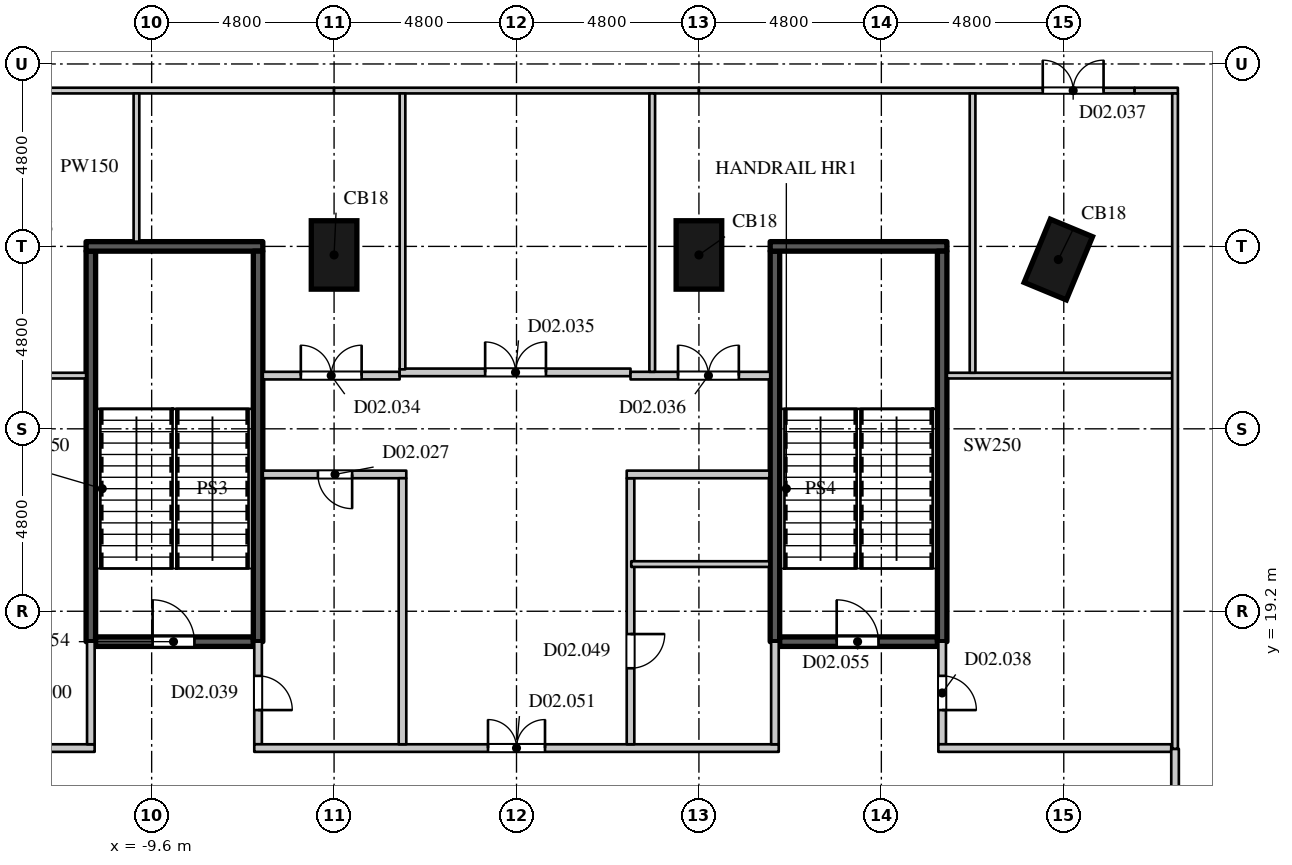
"""IFC4 building model, lengths in metres.
Left out: names, types, materials, properties, quantities, classifications, styles, units other than length and angle.
Written with IfcOpenShell. Run it as: python <this file> out.ifc"""

import sys

from ifc_helpers import new_model, si_unit, direction, frame, frame_2d, origin, origin_2d, place, context, subcontext, project, spatial, rectangle, extrude, element, fill, save


model = new_model("IFC4")
c1 = context("Model", 3, precision=1e-05, world=origin(), true_north=direction((0.0, 1.0)))
c2 = subcontext(c1, "Body", "Model", "MODEL_VIEW")
j1 = project(units=[si_unit("LENGTHUNIT", "METRE"), si_unit("PLANEANGLEUNIT", "RADIAN")], contexts=[c1])
p1 = place(None, origin())
s1 = spatial("IfcSite", under=j1, at=p1, CompositionType="ELEMENT")
p2 = place(p1, origin())
s2 = spatial("IfcBuilding", under=s1, at=p2, CompositionType="ELEMENT")
p3 = place(p2, frame((0.0, 0.0, 11.0)))
s3 = spatial("IfcBuildingStorey", under=s2, at=p3, CompositionType="ELEMENT", Elevation=11.0)
for number, where, z_axis, x_axis in (
    (1, (14.257, 28.454, 0.0), (0.0, 0.0, 1.0), (-0.924, 0.383, 0.0)),
    (2, (-4.8, 28.575, 0.0), (0.0, 0.0, 1.0), (-1.0, 0.0, 0.0)),
    (3, (4.8, 28.575, 0.0), (0.0, 0.0, 1.0), (-1.0, 0.0, 0.0)),
):
    element("IfcColumn", number, at=place(p3, frame(where, z_axis=z_axis, x_axis=x_axis)), inside=s3, PredefinedType="COLUMN", context=c2, shape_type="SweptSolid", body=[
        extrude(rectangle(XDim=1.2, YDim=1.8, at=origin_2d()), origin(), (0.0, 0.0, 1.0), 5.0),
    ])
p4 = place(p3, frame((-17.228, 15.6, 0.0), z_axis=(0.0, 0.0, 1.0), x_axis=(1.0, 0.0, 0.0)))
e4 = element("IfcWall", 4, at=p4, inside=s3, PredefinedType="PARTITIONING", context=c2, shape_type="SweptSolid", body=[
    extrude(rectangle(XDim=6.128, YDim=0.2, at=frame_2d((3.064, 0.0))), origin(), (0.0, 0.0, 1.0), 4.65),
])
p5 = place(p4, frame((2.25, 0.0, 0.0)))
e5 = element("IfcOpeningElement", 5, at=p5, cuts=e4, PredefinedType="OPENING", context=c2, shape_type="SweptSolid", body=[
    extrude(rectangle(XDim=1.6, YDim=2.4, at=frame_2d((0.8, 1.2))), frame((0.0, 0.11, 0.0), z_axis=(0.0, -1.0, 0.0), x_axis=(1.0, 0.0, 0.0)), (0.0, 0.0, 1.0), 0.22),
])
p6 = place(p3, frame((-11.2, 15.7, 0.0), z_axis=(0.0, 0.0, 1.0), x_axis=(0.0, 1.0, 0.0)))
e6 = element("IfcWall", 6, at=p6, inside=s3, PredefinedType="PARTITIONING", context=c2, shape_type="SweptSolid", body=[
    extrude(rectangle(XDim=2.7, YDim=0.2, at=frame_2d((1.35, 0.0))), origin(), (0.0, 0.0, 1.0), 4.65),
])
p7 = place(p3, frame((-6.8, 15.7, 0.0), z_axis=(0.0, 0.0, 1.0), x_axis=(0.0, 1.0, 0.0)))
e7 = element("IfcWall", 7, at=p7, inside=s3, PredefinedType="PARTITIONING", context=c2, shape_type="SweptSolid", body=[
    extrude(rectangle(XDim=2.7, YDim=0.2, at=frame_2d((1.35, 0.0))), origin(), (0.0, 0.0, 1.0), 4.65),
])
p8 = place(p7, frame((0.9, 0.0, 0.0)))
e8 = element("IfcOpeningElement", 8, at=p8, cuts=e7, PredefinedType="OPENING", context=c2, shape_type="SweptSolid", body=[
    extrude(rectangle(XDim=0.9, YDim=2.2, at=frame_2d((0.45, 1.1))), frame((0.0, 0.11, 0.0), z_axis=(0.0, -1.0, 0.0), x_axis=(1.0, 0.0, 0.0)), (0.0, 0.0, 1.0), 0.22),
])
p9 = place(p3, frame((-6.9, 15.6, 0.0), z_axis=(0.0, 0.0, 1.0), x_axis=(1.0, 0.0, 0.0)))
e9 = element("IfcWall", 9, at=p9, inside=s3, PredefinedType="PARTITIONING", context=c2, shape_type="SweptSolid", body=[
    extrude(rectangle(XDim=13.8, YDim=0.2, at=frame_2d((6.9, 0.0))), origin(), (0.0, 0.0, 1.0), 4.65),
])
p10 = place(p9, frame((6.15, 0.0, 0.0)))
e10 = element("IfcOpeningElement", 10, at=p10, cuts=e9, PredefinedType="OPENING", context=c2, shape_type="SweptSolid", body=[
    extrude(rectangle(XDim=1.5, YDim=2.2, at=frame_2d((0.75, 1.1))), frame((0.0, 0.11, 0.0), z_axis=(0.0, -1.0, 0.0), x_axis=(1.0, 0.0, 0.0)), (0.0, 0.0, 1.0), 0.22),
])
p11 = place(p3, frame((-6.675, 22.8, 0.0), z_axis=(0.0, 0.0, 1.0), x_axis=(1.0, 0.0, 0.0)))
e11 = element("IfcWall", 11, at=p11, inside=s3, PredefinedType="PARTITIONING", context=c2, shape_type="SweptSolid", body=[
    extrude(rectangle(XDim=3.775, YDim=0.2, at=frame_2d((1.888, 0.0))), origin(), (0.0, 0.0, 1.0), 4.65),
])
p12 = place(p11, frame((1.45, 0.0, 0.0)))
e12 = element("IfcOpeningElement", 12, at=p12, cuts=e11, PredefinedType="OPENING", context=c2, shape_type="SweptSolid", body=[
    extrude(rectangle(XDim=0.9, YDim=2.2, at=frame_2d((0.45, 1.1))), frame((0.0, 0.11, 0.0), z_axis=(0.0, -1.0, 0.0), x_axis=(1.0, 0.0, 0.0)), (0.0, 0.0, 1.0), 0.22),
])
p13 = place(p3, frame((-6.675, 25.4, 0.0), z_axis=(0.0, 0.0, 1.0), x_axis=(1.0, 0.0, 0.0)))
e13 = element("IfcWall", 13, at=p13, inside=s3, PredefinedType="PARTITIONING", context=c2, shape_type="SweptSolid", body=[
    extrude(rectangle(XDim=3.6, YDim=0.2, at=frame_2d((1.8, 0.0))), origin(), (0.0, 0.0, 1.0), 4.65),
])
p14 = place(p13, frame((1.0, 0.0, 0.0)))
e14 = element("IfcOpeningElement", 14, at=p14, cuts=e13, PredefinedType="OPENING", context=c2, shape_type="SweptSolid", body=[
    extrude(rectangle(XDim=1.6, YDim=2.4, at=frame_2d((0.8, 1.2))), frame((0.0, 0.11, 0.0), z_axis=(0.0, -1.0, 0.0), x_axis=(1.0, 0.0, 0.0)), (0.0, 0.0, 1.0), 0.22),
])
p15 = place(p3, frame((-3.0, 15.7, 0.0), z_axis=(0.0, 0.0, 1.0), x_axis=(0.0, 1.0, 0.0)))
e15 = element("IfcWall", 15, at=p15, inside=s3, PredefinedType="PARTITIONING", context=c2, shape_type="SweptSolid", body=[
    extrude(rectangle(XDim=7.0, YDim=0.2, at=frame_2d((3.5, 0.0))), origin(), (0.0, 0.0, 1.0), 4.65),
])
p16 = place(p3, frame((-3.075, 25.485, 0.0), z_axis=(0.0, 0.0, 1.0), x_axis=(1.0, 0.0, 0.0)))
e16 = element("IfcWall", 16, at=p16, inside=s3, PredefinedType="PARTITIONING", context=c2, shape_type="SweptSolid", body=[
    extrude(rectangle(XDim=6.075, YDim=0.2, at=frame_2d((3.038, 0.0))), origin(), (0.0, 0.0, 1.0), 4.65),
])
p17 = place(p16, frame((2.25, 0.0, 0.0)))
e17 = element("IfcOpeningElement", 17, at=p17, cuts=e16, PredefinedType="OPENING", context=c2, shape_type="SweptSolid", body=[
    extrude(rectangle(XDim=1.6, YDim=2.4, at=frame_2d((0.8, 1.2))), frame((0.0, 0.11, 0.0), z_axis=(0.0, -1.0, 0.0), x_axis=(1.0, 0.0, 0.0)), (0.0, 0.0, 1.0), 0.22),
])
p18 = place(p3, frame((3.0, 15.7, 0.0), z_axis=(0.0, 0.0, 1.0), x_axis=(0.0, 1.0, 0.0)))
e18 = element("IfcWall", 18, at=p18, inside=s3, PredefinedType="PARTITIONING", context=c2, shape_type="SweptSolid", body=[
    extrude(rectangle(XDim=7.0, YDim=0.2, at=frame_2d((3.5, 0.0))), origin(), (0.0, 0.0, 1.0), 4.65),
])
p19 = place(p18, frame((2.0, 0.0, 0.0)))
e19 = element("IfcOpeningElement", 19, at=p19, cuts=e18, PredefinedType="OPENING", context=c2, shape_type="SweptSolid", body=[
    extrude(rectangle(XDim=0.9, YDim=2.2, at=frame_2d((0.45, 1.1))), frame((0.0, 0.11, 0.0), z_axis=(0.0, -1.0, 0.0), x_axis=(1.0, 0.0, 0.0)), (0.0, 0.0, 1.0), 0.22),
])
p20 = place(p3, frame((2.9, 22.8, 0.0), z_axis=(0.0, 0.0, 1.0), x_axis=(1.0, 0.0, 0.0)))
e20 = element("IfcWall", 20, at=p20, inside=s3, PredefinedType="PARTITIONING", context=c2, shape_type="SweptSolid", body=[
    extrude(rectangle(XDim=3.755, YDim=0.2, at=frame_2d((1.877, 0.0))), origin(), (0.0, 0.0, 1.0), 4.65),
])
p21 = place(p3, frame((3.0, 25.4, 0.0), z_axis=(0.0, 0.0, 1.0), x_axis=(1.0, 0.0, 0.0)))
e21 = element("IfcWall", 21, at=p21, inside=s3, PredefinedType="PARTITIONING", context=c2, shape_type="SweptSolid", body=[
    extrude(rectangle(XDim=3.675, YDim=0.2, at=frame_2d((1.837, 0.0))), origin(), (0.0, 0.0, 1.0), 4.65),
])
p22 = place(p21, frame((1.25, 0.0, 0.0)))
e22 = element("IfcOpeningElement", 22, at=p22, cuts=e21, PredefinedType="OPENING", context=c2, shape_type="SweptSolid", body=[
    extrude(rectangle(XDim=1.6, YDim=2.4, at=frame_2d((0.8, 1.2))), frame((0.0, 0.11, 0.0), z_axis=(0.0, -1.0, 0.0), x_axis=(1.0, 0.0, 0.0)), (0.0, 0.0, 1.0), 0.22),
])
p23 = place(p3, frame((6.8, 15.7, 0.0), z_axis=(0.0, 0.0, 1.0), x_axis=(0.0, 1.0, 0.0)))
e23 = element("IfcWall", 23, at=p23, inside=s3, PredefinedType="PARTITIONING", context=c2, shape_type="SweptSolid", body=[
    extrude(rectangle(XDim=2.7, YDim=0.2, at=frame_2d((1.35, 0.0))), origin(), (0.0, 0.0, 1.0), 4.65),
])
p24 = place(p3, frame((11.2, 15.7, 0.0), z_axis=(0.0, 0.0, 1.0), x_axis=(0.0, 1.0, 0.0)))
e24 = element("IfcWall", 24, at=p24, inside=s3, PredefinedType="PARTITIONING", context=c2, shape_type="SweptSolid", body=[
    extrude(rectangle(XDim=2.7, YDim=0.2, at=frame_2d((1.35, 0.0))), origin(), (0.0, 0.0, 1.0), 4.65),
])
p25 = place(p24, frame((0.9, 0.0, 0.0)))
e25 = element("IfcOpeningElement", 25, at=p25, cuts=e24, PredefinedType="OPENING", context=c2, shape_type="SweptSolid", body=[
    extrude(rectangle(XDim=0.9, YDim=2.2, at=frame_2d((0.45, 1.1))), frame((0.0, 0.11, 0.0), z_axis=(0.0, -1.0, 0.0), x_axis=(1.0, 0.0, 0.0)), (0.0, 0.0, 1.0), 0.22),
])
p26 = place(p3, frame((11.1, 15.6, 0.0), z_axis=(0.0, 0.0, 1.0), x_axis=(1.0, 0.0, 0.0)))
e26 = element("IfcWall", 26, at=p26, inside=s3, PredefinedType="PARTITIONING", context=c2, shape_type="SweptSolid", body=[
    extrude(rectangle(XDim=6.128, YDim=0.2, at=frame_2d((3.064, 0.0))), origin(), (0.0, 0.0, 1.0), 4.65),
])
p27 = place(p3, frame((17.328, 11.3, 0.0), z_axis=(0.0, 0.0, 1.0), x_axis=(0.0, 1.0, 0.0)))
e27 = element("IfcWall", 27, at=p27, inside=s3, PredefinedType="PARTITIONING", context=c2, shape_type="SweptSolid", body=[
    extrude(rectangle(XDim=4.28, YDim=0.2, at=frame_2d((2.14, 0.0))), origin(), (0.0, 0.0, 1.0), 4.65),
])
p28 = place(p3, frame((-17.253, 25.4, 0.0), z_axis=(0.0, 0.0, 1.0), x_axis=(1.0, 0.0, 0.0)))
e28 = element("IfcWall", 28, at=p28, inside=s3, PredefinedType="PARTITIONING", context=c2, shape_type="SweptSolid", body=[
    extrude(rectangle(XDim=5.928, YDim=0.15, at=frame_2d((2.964, 0.0))), origin(), (0.0, 0.0, 1.0), 4.65),
])
p29 = place(p3, frame((-16.264, 32.9, 0.0), z_axis=(0.0, 0.0, 1.0), x_axis=(1.0, 0.0, 0.0)))
e29 = element("IfcWall", 29, at=p29, inside=s3, PredefinedType="PARTITIONING", context=c2, shape_type="SweptSolid", body=[
    extrude(rectangle(XDim=11.464, YDim=0.15, at=frame_2d((5.732, 0.0))), origin(), (0.0, 0.0, 1.0), 3.4),
])
p30 = place(p3, frame((-4.8, 32.9, 0.0), z_axis=(0.0, 0.0, 1.0), x_axis=(1.0, 0.0, 0.0)))
e30 = element("IfcWall", 30, at=p30, inside=s3, PredefinedType="PARTITIONING", context=c2, shape_type="SweptSolid", body=[
    extrude(rectangle(XDim=9.6, YDim=0.15, at=frame_2d((4.8, 0.0))), origin(), (0.0, 0.0, 1.0), 4.65),
])
p31 = place(p3, frame((4.8, 32.9, 0.0), z_axis=(0.0, 0.0, 1.0), x_axis=(1.0, 0.0, 0.0)))
e31 = element("IfcWall", 31, at=p31, inside=s3, PredefinedType="PARTITIONING", context=c2, shape_type="SweptSolid", body=[
    extrude(rectangle(XDim=11.464, YDim=0.15, at=frame_2d((5.732, 0.0))), origin(), (0.0, 0.0, 1.0), 3.4),
])
p32 = place(p31, frame((9.047, 0.0, 0.0)))
e32 = element("IfcOpeningElement", 32, at=p32, cuts=e31, PredefinedType="OPENING", context=c2, shape_type="SweptSolid", body=[
    extrude(rectangle(XDim=1.6, YDim=2.4, at=frame_2d((0.8, 1.2))), frame((0.0, 0.085, 0.0), z_axis=(0.0, -1.0, 0.0), x_axis=(1.0, 0.0, 0.0)), (0.0, 0.0, 1.0), 0.17),
])
p33 = place(p3, frame((16.264, 32.9, 0.0), z_axis=(0.0, 0.0, 1.0), x_axis=(1.0, 0.0, 0.0)))
e33 = element("IfcWall", 33, at=p33, inside=s3, PredefinedType="PARTITIONING", context=c2, shape_type="SweptSolid", body=[
    extrude(rectangle(XDim=1.138, YDim=0.15, at=frame_2d((0.569, 0.0))), origin(), (0.0, 0.0, 1.0), 4.65),
])
p34 = place(p3, frame((-10.0, 28.925, 0.0), z_axis=(0.0, 0.0, 1.0), x_axis=(0.0, 1.0, 0.0)))
e34 = element("IfcWall", 34, at=p34, inside=s3, PredefinedType="PARTITIONING", context=c2, shape_type="SweptSolid", body=[
    extrude(rectangle(XDim=3.9, YDim=0.15, at=frame_2d((1.95, 0.0))), origin(), (0.0, 0.0, 1.0), 4.65),
])
p35 = place(p3, frame((-3.0, 25.565, 0.0), z_axis=(0.0, 0.0, 1.0), x_axis=(0.0, 1.0, 0.0)))
e35 = element("IfcWall", 35, at=p35, inside=s3, PredefinedType="PARTITIONING", context=c2, shape_type="SweptSolid", body=[
    extrude(rectangle(XDim=7.26, YDim=0.15, at=frame_2d((3.63, 0.0))), origin(), (0.0, 0.0, 1.0), 4.65),
])
p36 = place(p3, frame((3.02, 20.441, 0.0), z_axis=(0.0, 0.0, 1.0), x_axis=(1.0, 0.0, 0.0)))
e36 = element("IfcWall", 36, at=p36, inside=s3, PredefinedType="PARTITIONING", context=c2, shape_type="SweptSolid", body=[
    extrude(rectangle(XDim=3.635, YDim=0.15, at=frame_2d((1.817, 0.0))), origin(), (0.0, 0.0, 1.0), 4.65),
])
p37 = place(p3, frame((3.571, 25.5, 0.0), z_axis=(0.0, 0.0, 1.0), x_axis=(0.0, 1.0, 0.0)))
e37 = element("IfcWall", 37, at=p37, inside=s3, PredefinedType="PARTITIONING", context=c2, shape_type="SweptSolid", body=[
    extrude(rectangle(XDim=7.325, YDim=0.15, at=frame_2d((3.663, 0.0))), origin(), (0.0, 0.0, 1.0), 4.65),
])
p38 = place(p3, frame((11.325, 25.4, 0.0), z_axis=(0.0, 0.0, 1.0), x_axis=(1.0, 0.0, 0.0)))
e38 = element("IfcWall", 38, at=p38, inside=s3, PredefinedType="PARTITIONING", context=c2, shape_type="SweptSolid", body=[
    extrude(rectangle(XDim=5.928, YDim=0.15, at=frame_2d((2.964, 0.0))), origin(), (0.0, 0.0, 1.0), 4.65),
])
p39 = place(p3, frame((12.0, 25.475, 0.0), z_axis=(0.0, 0.0, 1.0), x_axis=(0.0, 1.0, 0.0)))
e39 = element("IfcWall", 39, at=p39, inside=s3, PredefinedType="PARTITIONING", context=c2, shape_type="SweptSolid", body=[
    extrude(rectangle(XDim=7.35, YDim=0.15, at=frame_2d((3.675, 0.0))), origin(), (0.0, 0.0, 1.0), 4.65),
])
p40 = place(p3, frame((17.328, 15.58, 0.0), z_axis=(0.0, 0.0, 1.0), x_axis=(0.0, 1.0, 0.0)))
e40 = element("IfcWall", 40, at=p40, inside=s3, PredefinedType="PARTITIONING", context=c2, shape_type="SweptSolid", body=[
    extrude(rectangle(XDim=17.244, YDim=0.15, at=frame_2d((8.622, 0.0))), origin(), (0.0, 0.0, 1.0), 4.65),
])
p41 = place(p3, frame((-11.2, 18.4, 0.0), z_axis=(0.0, 0.0, 1.0), x_axis=(0.0, 1.0, 0.0)))
e41 = element("IfcWall", 41, at=p41, inside=s3, PredefinedType="SHEAR", context=c2, shape_type="SweptSolid", body=[
    extrude(rectangle(XDim=10.275, YDim=0.25, at=frame_2d((5.138, 0.0))), origin(), (0.0, 0.0, 1.0), 4.65),
])
p42 = place(p3, frame((-11.075, 18.4, 0.0), z_axis=(0.0, 0.0, 1.0), x_axis=(1.0, 0.0, 0.0)))
e42 = element("IfcWall", 42, at=p42, inside=s3, PredefinedType="SHEAR", context=c2, shape_type="SweptSolid", body=[
    extrude(rectangle(XDim=4.15, YDim=0.25, at=frame_2d((2.075, 0.0))), origin(), (0.0, 0.0, 1.0), 4.65),
])
p43 = place(p42, frame((1.5, 0.0, 0.0)))
e43 = element("IfcOpeningElement", 43, at=p43, cuts=e42, PredefinedType="OPENING", context=c2, shape_type="SweptSolid", body=[
    extrude(rectangle(XDim=1.1, YDim=2.2, at=frame_2d((0.55, 1.1))), frame((0.0, 0.135, 0.0), z_axis=(0.0, -1.0, 0.0), x_axis=(1.0, 0.0, 0.0)), (0.0, 0.0, 1.0), 0.27),
])
p44 = place(p3, frame((-11.325, 28.8, 0.0), z_axis=(0.0, 0.0, 1.0), x_axis=(1.0, 0.0, 0.0)))
e44 = element("IfcWall", 44, at=p44, inside=s3, PredefinedType="SHEAR", context=c2, shape_type="SweptSolid", body=[
    extrude(rectangle(XDim=4.65, YDim=0.25, at=frame_2d((2.325, 0.0))), origin(), (0.0, 0.0, 1.0), 4.65),
])
for number, where, z_axis, x_axis in (
    (45, (-6.8, 18.4, 0.0), (0.0, 0.0, 1.0), (0.0, 1.0, 0.0)),
    (46, (6.8, 18.4, 0.0), (0.0, 0.0, 1.0), (0.0, 1.0, 0.0)),
):
    element("IfcWall", number, at=place(p3, frame(where, z_axis=z_axis, x_axis=x_axis)), inside=s3, PredefinedType="SHEAR", context=c2, shape_type="SweptSolid", body=[
        extrude(rectangle(XDim=10.275, YDim=0.25, at=frame_2d((5.138, 0.0))), origin(), (0.0, 0.0, 1.0), 4.65),
    ])
p45 = place(p3, frame((6.925, 18.4, 0.0), z_axis=(0.0, 0.0, 1.0), x_axis=(1.0, 0.0, 0.0)))
e47 = element("IfcWall", 47, at=p45, inside=s3, PredefinedType="SHEAR", context=c2, shape_type="SweptSolid", body=[
    extrude(rectangle(XDim=4.15, YDim=0.25, at=frame_2d((2.075, 0.0))), origin(), (0.0, 0.0, 1.0), 4.65),
])
p46 = place(p45, frame((1.5, 0.0, 0.0)))
e48 = element("IfcOpeningElement", 48, at=p46, cuts=e47, PredefinedType="OPENING", context=c2, shape_type="SweptSolid", body=[
    extrude(rectangle(XDim=1.1, YDim=2.2, at=frame_2d((0.55, 1.1))), frame((0.0, 0.135, 0.0), z_axis=(0.0, -1.0, 0.0), x_axis=(1.0, 0.0, 0.0)), (0.0, 0.0, 1.0), 0.27),
])
p47 = place(p3, frame((6.675, 28.8, 0.0), z_axis=(0.0, 0.0, 1.0), x_axis=(1.0, 0.0, 0.0)))
e49 = element("IfcWall", 49, at=p47, inside=s3, PredefinedType="SHEAR", context=c2, shape_type="SweptSolid", body=[
    extrude(rectangle(XDim=4.65, YDim=0.25, at=frame_2d((2.325, 0.0))), origin(), (0.0, 0.0, 1.0), 4.65),
])
p48 = place(p3, frame((11.2, 18.4, 0.0), z_axis=(0.0, 0.0, 1.0), x_axis=(0.0, 1.0, 0.0)))
e50 = element("IfcWall", 50, at=p48, inside=s3, PredefinedType="SHEAR", context=c2, shape_type="SweptSolid", body=[
    extrude(rectangle(XDim=10.275, YDim=0.25, at=frame_2d((5.138, 0.0))), origin(), (0.0, 0.0, 1.0), 4.65),
])
p49 = place(p12, origin())
e51 = element("IfcDoor", 51, at=p49, inside=s3, OperationType="SINGLE_SWING_LEFT", PredefinedType="DOOR", context=c2, shape_type="SweptSolid", body=[
    extrude(rectangle(XDim=0.9, YDim=2.2, at=frame_2d((0.45, 1.1))), frame((0.0, 0.025, 0.0), z_axis=(0.0, -1.0, 0.0), x_axis=(1.0, 0.0, 0.0)), (0.0, 0.0, 1.0), 0.05),
])
fill(e12, e51)
p50 = place(p14, origin())
e52 = element("IfcDoor", 52, at=p50, inside=s3, OperationType="DOUBLE_DOOR_SINGLE_SWING", PredefinedType="DOOR", context=c2, shape_type="SweptSolid", body=[
    extrude(rectangle(XDim=1.6, YDim=2.4, at=frame_2d((0.8, 1.2))), frame((0.0, 0.025, 0.0), z_axis=(0.0, -1.0, 0.0), x_axis=(1.0, 0.0, 0.0)), (0.0, 0.0, 1.0), 0.05),
])
fill(e14, e52)
p51 = place(p17, origin())
e53 = element("IfcDoor", 53, at=p51, inside=s3, OperationType="DOUBLE_DOOR_SINGLE_SWING", PredefinedType="DOOR", context=c2, shape_type="SweptSolid", body=[
    extrude(rectangle(XDim=1.6, YDim=2.4, at=frame_2d((0.8, 1.2))), frame((0.0, 0.025, 0.0), z_axis=(0.0, -1.0, 0.0), x_axis=(1.0, 0.0, 0.0)), (0.0, 0.0, 1.0), 0.05),
])
fill(e17, e53)
p52 = place(p22, origin())
e54 = element("IfcDoor", 54, at=p52, inside=s3, OperationType="DOUBLE_DOOR_SINGLE_SWING", PredefinedType="DOOR", context=c2, shape_type="SweptSolid", body=[
    extrude(rectangle(XDim=1.6, YDim=2.4, at=frame_2d((0.8, 1.2))), frame((0.0, 0.025, 0.0), z_axis=(0.0, -1.0, 0.0), x_axis=(1.0, 0.0, 0.0)), (0.0, 0.0, 1.0), 0.05),
])
fill(e22, e54)
p53 = place(p32, origin())
e55 = element("IfcDoor", 55, at=p53, inside=s3, OperationType="DOUBLE_DOOR_SINGLE_SWING", PredefinedType="DOOR", context=c2, shape_type="SweptSolid", body=[
    extrude(rectangle(XDim=1.6, YDim=2.4, at=frame_2d((0.8, 1.2))), frame((0.0, 0.025, 0.0), z_axis=(0.0, -1.0, 0.0), x_axis=(1.0, 0.0, 0.0)), (0.0, 0.0, 1.0), 0.05),
])
fill(e32, e55)
p54 = place(p25, origin())
e56 = element("IfcDoor", 56, at=p54, inside=s3, OperationType="SINGLE_SWING_RIGHT", PredefinedType="DOOR", context=c2, shape_type="SweptSolid", body=[
    extrude(rectangle(XDim=0.9, YDim=2.2, at=frame_2d((0.45, 1.1))), frame((0.0, 0.025, 0.0), z_axis=(0.0, -1.0, 0.0), x_axis=(1.0, 0.0, 0.0)), (0.0, 0.0, 1.0), 0.05),
])
fill(e25, e56)
p55 = place(p8, origin())
e57 = element("IfcDoor", 57, at=p55, inside=s3, OperationType="SINGLE_SWING_RIGHT", PredefinedType="DOOR", context=c2, shape_type="SweptSolid", body=[
    extrude(rectangle(XDim=0.9, YDim=2.2, at=frame_2d((0.45, 1.1))), frame((0.0, 0.025, 0.0), z_axis=(0.0, -1.0, 0.0), x_axis=(1.0, 0.0, 0.0)), (0.0, 0.0, 1.0), 0.05),
])
fill(e8, e57)
p56 = place(p19, origin())
e58 = element("IfcDoor", 58, at=p56, inside=s3, OperationType="SINGLE_SWING_LEFT", PredefinedType="DOOR", context=c2, shape_type="SweptSolid", body=[
    extrude(rectangle(XDim=0.9, YDim=2.2, at=frame_2d((0.45, 1.1))), frame((0.0, 0.025, 0.0), z_axis=(0.0, -1.0, 0.0), x_axis=(1.0, 0.0, 0.0)), (0.0, 0.0, 1.0), 0.05),
])
fill(e19, e58)
p57 = place(p10, origin())
e59 = element("IfcDoor", 59, at=p57, inside=s3, OperationType="DOUBLE_DOOR_SINGLE_SWING", PredefinedType="DOOR", context=c2, shape_type="SweptSolid", body=[
    extrude(rectangle(XDim=1.5, YDim=2.2, at=frame_2d((0.75, 1.1))), frame((0.0, 0.025, 0.0), z_axis=(0.0, -1.0, 0.0), x_axis=(1.0, 0.0, 0.0)), (0.0, 0.0, 1.0), 0.05),
])
fill(e10, e59)
p58 = place(p43, origin())
e60 = element("IfcDoor", 60, at=p58, inside=s3, OperationType="SINGLE_SWING_LEFT", PredefinedType="DOOR", context=c2, shape_type="SweptSolid", body=[
    extrude(rectangle(XDim=1.1, YDim=2.2, at=frame_2d((0.55, 1.1))), frame((0.0, 0.025, 0.0), z_axis=(0.0, -1.0, 0.0), x_axis=(1.0, 0.0, 0.0)), (0.0, 0.0, 1.0), 0.05),
])
fill(e43, e60)
p59 = place(p46, origin())
e61 = element("IfcDoor", 61, at=p59, inside=s3, OperationType="SINGLE_SWING_LEFT", PredefinedType="DOOR", context=c2, shape_type="SweptSolid", body=[
    extrude(rectangle(XDim=1.1, YDim=2.2, at=frame_2d((0.55, 1.1))), frame((0.0, 0.025, 0.0), z_axis=(0.0, -1.0, 0.0), x_axis=(1.0, 0.0, 0.0)), (0.0, 0.0, 1.0), 0.05),
])
fill(e48, e61)
save(model, sys.argv[1])
